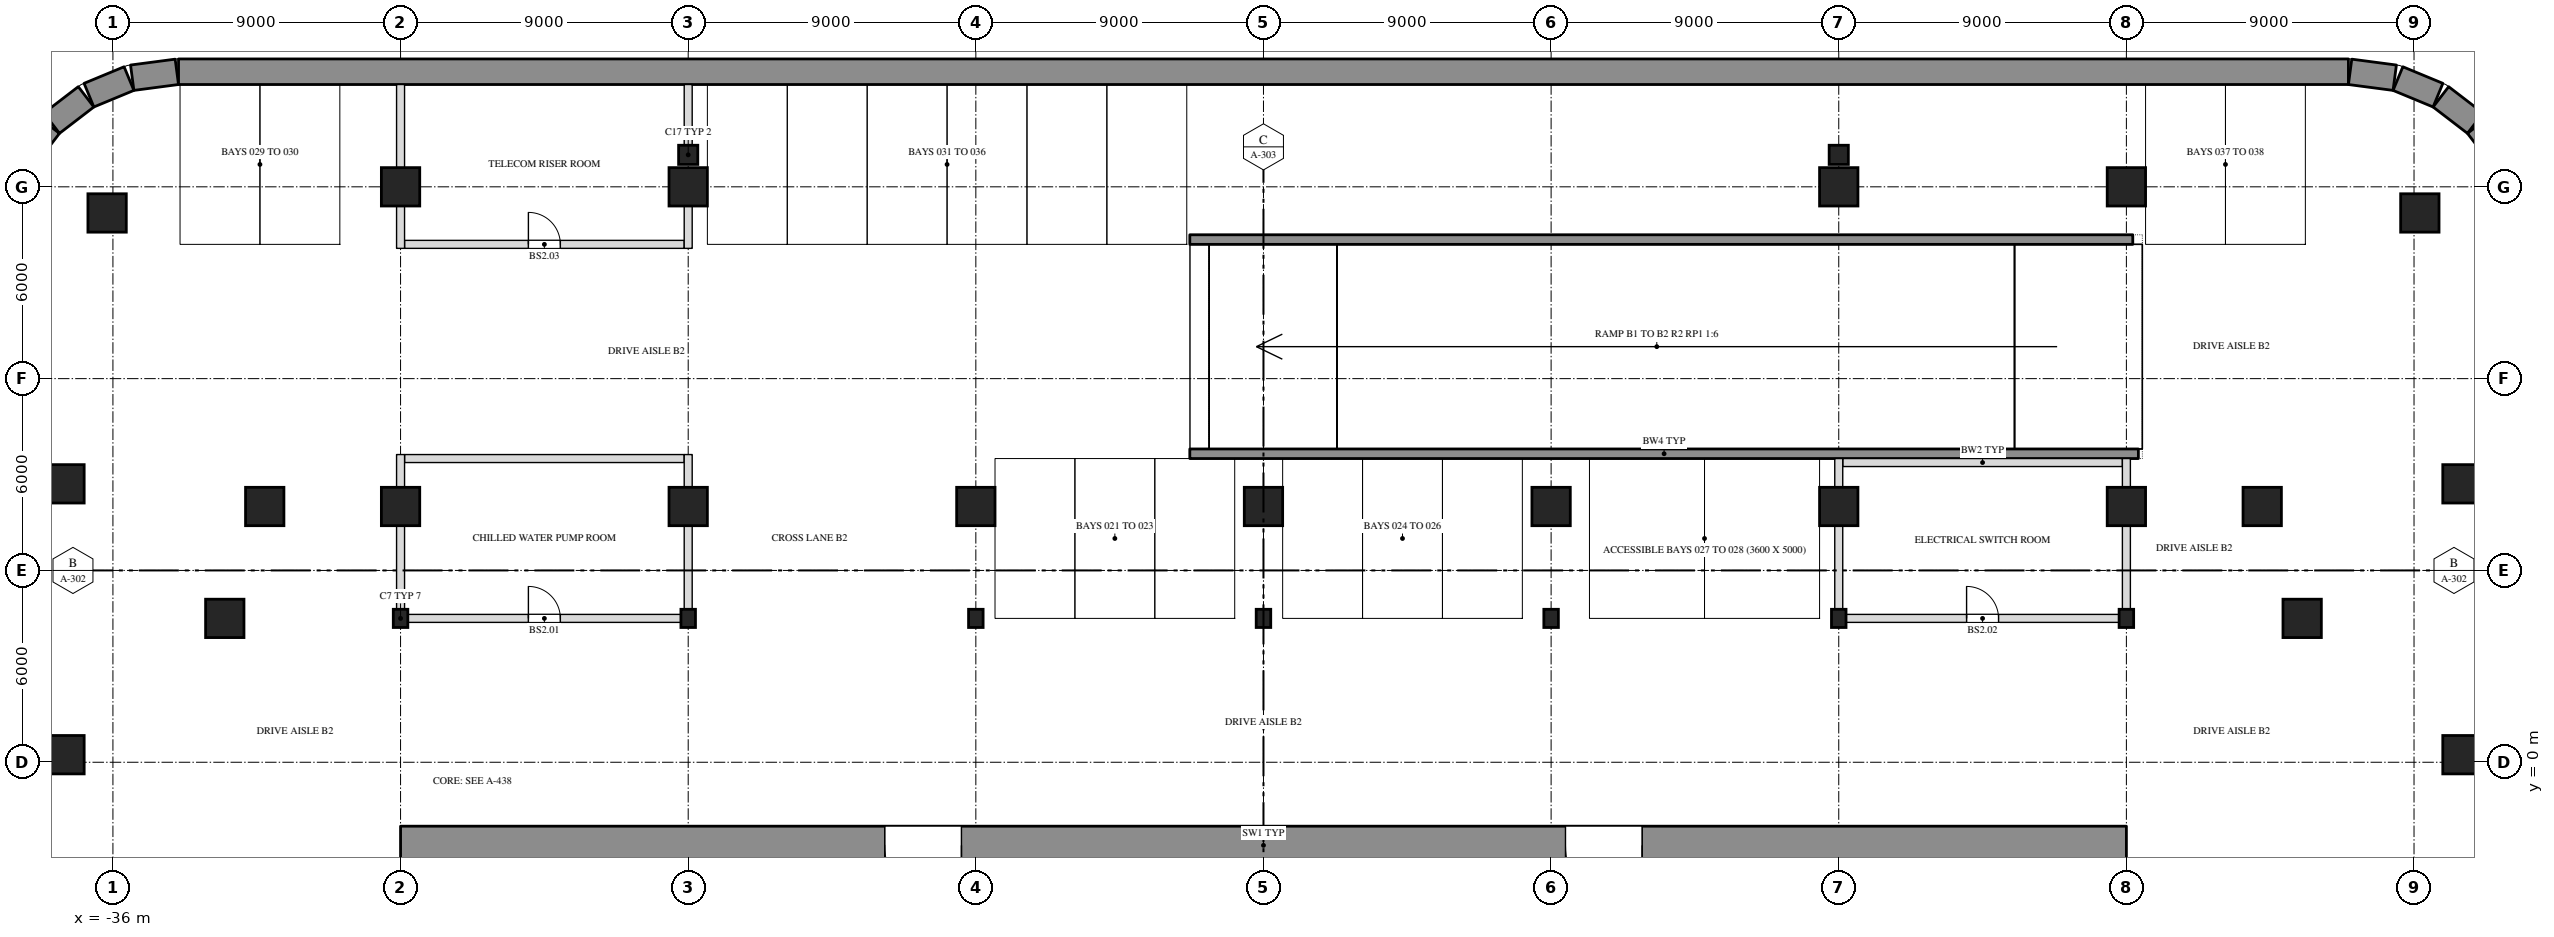
"""IFC4 building model, lengths in metres.
Left out: names, types, materials, properties, quantities, classifications, styles, units other than length and angle.
Written with IfcOpenShell. Run it as: python <this file> out.ifc"""

import sys

from ifc_helpers import new_model, si_unit, direction, frame, frame_2d, origin, origin_2d, place, context, subcontext, project, spatial, rectangle, i_section, extrude, element, fill, save


model = new_model("IFC4")
c1 = context("Model", 3, precision=1e-05, world=origin(), true_north=direction((0.0, 1.0)))
c2 = subcontext(c1, "Body", "Model", "MODEL_VIEW")
j1 = project(units=[si_unit("LENGTHUNIT", "METRE"), si_unit("PLANEANGLEUNIT", "RADIAN")], contexts=[c1])
p1 = place(None, origin())
s1 = spatial("IfcSite", under=j1, at=p1, CompositionType="ELEMENT")
p2 = place(p1, origin())
s2 = spatial("IfcBuilding", under=s1, at=p2, CompositionType="ELEMENT")
p3 = place(p2, frame((0.0, 0.0, -8.4)))
s3 = spatial("IfcBuildingStorey", under=s2, at=p3, CompositionType="ELEMENT", Elevation=-8.4)
for number, where, z_axis, x_axis in (
    (1, (-38.815, 18.84, 0.0), (0.0, 0.0, 1.0), (0.609, 0.793, 0.0)),
    (2, (-37.916, 19.99, 0.0), (0.0, 0.0, 1.0), (0.793, 0.609, 0.0)),
    (3, (-36.75, 20.867, 0.0), (0.0, 0.0, 1.0), (0.924, 0.383, 0.0)),
):
    element("IfcWall", number, at=place(p3, frame(where, z_axis=z_axis, x_axis=x_axis)), inside=s3, PredefinedType="SOLIDWALL", context=c2, shape_type="SweptSolid", body=[
        extrude(rectangle(XDim=1.355, YDim=0.8, at=frame_2d((0.678, 0.0))), origin(), (0.0, 0.0, 1.0), 4.2),
    ])
p4 = place(p3, frame((-35.396, 21.413, 0.0), z_axis=(0.0, 0.0, 1.0), x_axis=(0.99144603414, 0.130517283865, 0.0)))
e4 = element("IfcWall", 4, at=p4, inside=s3, PredefinedType="SOLIDWALL", context=c2, shape_type="SweptSolid", body=[
    extrude(rectangle(XDim=1.408, YDim=0.8, at=frame_2d((0.704, 0.0))), origin(), (0.0, 0.0, 1.0), 4.2),
])
p5 = place(p3, frame((-33.948, 21.6, 0.0), z_axis=(0.0, 0.0, 1.0), x_axis=(1.0, 0.0, 0.0)))
e5 = element("IfcWall", 5, at=p5, inside=s3, PredefinedType="SOLIDWALL", context=c2, shape_type="SweptSolid", body=[
    extrude(rectangle(XDim=67.895, YDim=0.8, at=frame_2d((33.948, 0.0))), origin(), (0.0, 0.0, 1.0), 4.2),
])
p6 = place(p3, frame((34.0, 21.597, 0.0), z_axis=(0.0, 0.0, 1.0), x_axis=(0.99144603414, -0.130517283865, 0.0)))
e6 = element("IfcWall", 6, at=p6, inside=s3, PredefinedType="SOLIDWALL", context=c2, shape_type="SweptSolid", body=[
    extrude(rectangle(XDim=1.408, YDim=0.8, at=frame_2d((0.704, 0.0))), origin(), (0.0, 0.0, 1.0), 4.2),
])
for number, where, z_axis, x_axis in (
    (7, (35.497, 21.386, 0.0), (0.0, 0.0, 1.0), (0.924, -0.383, 0.0)),
    (8, (36.84, 20.815, 0.0), (0.0, 0.0, 1.0), (0.793, -0.609, 0.0)),
    (9, (37.99, 19.916, 0.0), (0.0, 0.0, 1.0), (0.609, -0.793, 0.0)),
):
    element("IfcWall", number, at=place(p3, frame(where, z_axis=z_axis, x_axis=x_axis)), inside=s3, PredefinedType="SOLIDWALL", context=c2, shape_type="SweptSolid", body=[
        extrude(rectangle(XDim=1.355, YDim=0.8, at=frame_2d((0.678, 0.0))), origin(), (0.0, 0.0, 1.0), 4.2),
    ])
for number, where, z_axis, x_axis in (
    (10, (-37.5, 0.236, 0.0), (0.0, 0.0, 1.0), (1.0, 0.0, 0.0)),
    (11, (37.5, 0.236, 0.0), (0.0, 0.0, 1.0), (1.0, 0.0, 0.0)),
    (12, (-32.5, 4.5, 0.0), (0.0, 0.0, 1.0), (1.0, 0.0, 0.0)),
):
    element("IfcColumn", number, at=place(p3, frame(where, z_axis=z_axis, x_axis=x_axis)), inside=s3, PredefinedType="COLUMN", context=c2, shape_type="SweptSolid", body=[
        extrude(rectangle(XDim=1.2, YDim=1.2, at=origin_2d()), origin(), (0.0, 0.0, 1.0), 4.2),
    ])
for number, where, z_axis, x_axis in (
    (13, (-27.0, 4.5, 0.0), (0.0, 0.0, 1.0), (1.0, 0.0, 0.0)),
    (14, (-18.0, 4.5, 0.0), (0.0, 0.0, 1.0), (1.0, 0.0, 0.0)),
    (15, (-9.0, 4.5, 0.0), (0.0, 0.0, 1.0), (1.0, 0.0, 0.0)),
    (16, (0.0, 4.5, 0.0), (0.0, 0.0, 1.0), (1.0, 0.0, 0.0)),
    (17, (9.0, 4.5, 0.0), (0.0, 0.0, 1.0), (1.0, 0.0, 0.0)),
    (18, (18.0, 4.5, 0.0), (0.0, 0.0, 1.0), (1.0, 0.0, 0.0)),
    (19, (27.0, 4.5, 0.0), (0.0, 0.0, 1.0), (1.0, 0.0, 0.0)),
):
    element("IfcColumn", number, at=place(p3, frame(where, z_axis=z_axis, x_axis=x_axis)), inside=s3, PredefinedType="COLUMN", context=c2, shape_type="SweptSolid", body=[
        extrude(i_section(OverallWidth=0.455, OverallDepth=0.569, WebThickness=0.078, FlangeThickness=0.125, at=origin_2d()), origin(), (0.0, 0.0, 1.0), 4.2),
    ])
for number, where, z_axis, x_axis in (
    (20, (32.5, 4.5, 0.0), (0.0, 0.0, 1.0), (1.0, 0.0, 0.0)),
    (21, (-31.25, 8.0, 0.0), (0.0, 0.0, 1.0), (1.0, 0.0, 0.0)),
    (22, (-27.0, 8.0, 0.0), (0.0, 0.0, 1.0), (1.0, 0.0, 0.0)),
    (23, (-18.0, 8.0, 0.0), (0.0, 0.0, 1.0), (1.0, 0.0, 0.0)),
    (24, (-9.0, 8.0, 0.0), (0.0, 0.0, 1.0), (1.0, 0.0, 0.0)),
    (25, (0.0, 8.0, 0.0), (0.0, 0.0, 1.0), (1.0, 0.0, 0.0)),
    (26, (9.0, 8.0, 0.0), (0.0, 0.0, 1.0), (1.0, 0.0, 0.0)),
    (27, (18.0, 8.0, 0.0), (0.0, 0.0, 1.0), (1.0, 0.0, 0.0)),
    (28, (27.0, 8.0, 0.0), (0.0, 0.0, 1.0), (1.0, 0.0, 0.0)),
    (29, (31.25, 8.0, 0.0), (0.0, 0.0, 1.0), (1.0, 0.0, 0.0)),
    (30, (-37.5, 8.709, 0.0), (0.0, 0.0, 1.0), (1.0, 0.0, 0.0)),
    (31, (37.5, 8.709, 0.0), (0.0, 0.0, 1.0), (1.0, 0.0, 0.0)),
    (32, (-36.182, 17.182, 0.0), (0.0, 0.0, 1.0), (1.0, 0.0, 0.0)),
    (33, (36.182, 17.182, 0.0), (0.0, 0.0, 1.0), (1.0, 0.0, 0.0)),
    (34, (-27.0, 18.0, 0.0), (0.0, 0.0, 1.0), (1.0, 0.0, 0.0)),
    (35, (-18.0, 18.0, 0.0), (0.0, 0.0, 1.0), (1.0, 0.0, 0.0)),
    (36, (18.0, 18.0, 0.0), (0.0, 0.0, 1.0), (1.0, 0.0, 0.0)),
    (37, (27.0, 18.0, 0.0), (0.0, 0.0, 1.0), (1.0, 0.0, 0.0)),
):
    element("IfcColumn", number, at=place(p3, frame(where, z_axis=z_axis, x_axis=x_axis)), inside=s3, PredefinedType="COLUMN", context=c2, shape_type="SweptSolid", body=[
        extrude(rectangle(XDim=1.2, YDim=1.2, at=origin_2d()), origin(), (0.0, 0.0, 1.0), 4.2),
    ])
for number, where, z_axis, x_axis in (
    (38, (-18.0, 19.0, 0.0), (0.0, 0.0, 1.0), (1.0, 0.0, 0.0)),
    (39, (18.0, 19.0, 0.0), (0.0, 0.0, 1.0), (1.0, 0.0, 0.0)),
):
    element("IfcColumn", number, at=place(p3, frame(where, z_axis=z_axis, x_axis=x_axis)), inside=s3, PredefinedType="COLUMN", context=c2, shape_type="SweptSolid", body=[
        extrude(rectangle(XDim=0.6, YDim=0.6, at=origin_2d()), origin(), (0.0, 0.0, 1.0), 4.2),
    ])
p7 = place(p3, frame((-27.0, -2.6, 0.0), z_axis=(0.0, 0.0, 1.0), x_axis=(1.0, 0.0, 0.0)))
e40 = element("IfcWall", 40, at=p7, inside=s3, PredefinedType="SHEAR", context=c2, shape_type="SweptSolid", body=[
    extrude(rectangle(XDim=54.0, YDim=1.2, at=frame_2d((27.0, 0.0))), origin(), (0.0, 0.0, 1.0), 3.9),
])
p8 = place(p7, frame((15.15, 0.0, 0.0)))
e41 = element("IfcOpeningElement", 41, at=p8, cuts=e40, PredefinedType="OPENING", context=c2, shape_type="SweptSolid", body=[
    extrude(rectangle(XDim=2.4, YDim=2.1, at=frame_2d((1.2, 1.05))), frame((0.0, 0.612, 0.0), z_axis=(0.0, -1.0, 0.0), x_axis=(1.0, 0.0, 0.0)), (0.0, 0.0, 1.0), 1.224),
])
p9 = place(p7, frame((36.45, 0.0, 0.0)))
e42 = element("IfcOpeningElement", 42, at=p9, cuts=e40, PredefinedType="OPENING", context=c2, shape_type="SweptSolid", body=[
    extrude(rectangle(XDim=2.4, YDim=2.1, at=frame_2d((1.2, 1.05))), frame((0.0, 0.612, 0.0), z_axis=(0.0, -1.0, 0.0), x_axis=(1.0, 0.0, 0.0)), (0.0, 0.0, 1.0), 1.224),
])
p10 = place(p3, frame((-26.773, 4.5, 0.0), z_axis=(0.0, 0.0, 1.0), x_axis=(1.0, 0.0, 0.0)))
e43 = element("IfcWall", 43, at=p10, inside=s3, PredefinedType="SOLIDWALL", context=c2, shape_type="SweptSolid", body=[
    extrude(rectangle(XDim=8.545, YDim=0.25, at=frame_2d((4.273, 0.0))), origin(), (0.0, 0.0, 1.0), 3.9),
])
p11 = place(p10, frame((3.773, 0.0, 0.0)))
e44 = element("IfcOpeningElement", 44, at=p11, cuts=e43, PredefinedType="OPENING", context=c2, shape_type="SweptSolid", body=[
    extrude(rectangle(XDim=1.0, YDim=2.1, at=frame_2d((0.5, 1.05))), frame((0.0, 0.137, 0.0), z_axis=(0.0, -1.0, 0.0), x_axis=(1.0, 0.0, 0.0)), (0.0, 0.0, 1.0), 0.274),
])
p12 = place(p3, frame((18.227, 4.5, 0.0), z_axis=(0.0, 0.0, 1.0), x_axis=(1.0, 0.0, 0.0)))
e45 = element("IfcWall", 45, at=p12, inside=s3, PredefinedType="SOLIDWALL", context=c2, shape_type="SweptSolid", body=[
    extrude(rectangle(XDim=8.545, YDim=0.25, at=frame_2d((4.273, 0.0))), origin(), (0.0, 0.0, 1.0), 3.9),
])
p13 = place(p12, frame((3.773, 0.0, 0.0)))
e46 = element("IfcOpeningElement", 46, at=p13, cuts=e45, PredefinedType="OPENING", context=c2, shape_type="SweptSolid", body=[
    extrude(rectangle(XDim=1.0, YDim=2.1, at=frame_2d((0.5, 1.05))), frame((0.0, 0.137, 0.0), z_axis=(0.0, -1.0, 0.0), x_axis=(1.0, 0.0, 0.0)), (0.0, 0.0, 1.0), 0.274),
])
for number, where, z_axis, x_axis in (
    (47, (18.125, 9.375, 0.0), (0.0, 0.0, 1.0), (1.0, 0.0, 0.0)),
    (48, (-26.875, 9.5, 0.0), (0.0, 0.0, 1.0), (1.0, 0.0, 0.0)),
):
    element("IfcWall", number, at=place(p3, frame(where, z_axis=z_axis, x_axis=x_axis)), inside=s3, PredefinedType="SOLIDWALL", context=c2, shape_type="SweptSolid", body=[
        extrude(rectangle(XDim=8.75, YDim=0.25, at=frame_2d((4.375, 0.0))), origin(), (0.0, 0.0, 1.0), 3.9),
    ])
p14 = place(p3, frame((-26.875, 16.2, 0.0), z_axis=(0.0, 0.0, 1.0), x_axis=(1.0, 0.0, 0.0)))
e49 = element("IfcWall", 49, at=p14, inside=s3, PredefinedType="SOLIDWALL", context=c2, shape_type="SweptSolid", body=[
    extrude(rectangle(XDim=8.75, YDim=0.25, at=frame_2d((4.375, 0.0))), origin(), (0.0, 0.0, 1.0), 3.9),
])
p15 = place(p14, frame((3.875, 0.0, 0.0)))
e50 = element("IfcOpeningElement", 50, at=p15, cuts=e49, PredefinedType="OPENING", context=c2, shape_type="SweptSolid", body=[
    extrude(rectangle(XDim=1.0, YDim=2.1, at=frame_2d((0.5, 1.05))), frame((0.0, 0.137, 0.0), z_axis=(0.0, -1.0, 0.0), x_axis=(1.0, 0.0, 0.0)), (0.0, 0.0, 1.0), 0.274),
])
p16 = place(p3, frame((-27.0, 4.784, 0.0), z_axis=(0.0, 0.0, 1.0), x_axis=(0.0, 1.0, 0.0)))
e51 = element("IfcWall", 51, at=p16, inside=s3, PredefinedType="SOLIDWALL", context=c2, shape_type="SweptSolid", body=[
    extrude(rectangle(XDim=2.615, YDim=0.25, at=frame_2d((1.308, 0.0))), origin(), (0.0, 0.0, 1.0), 3.9),
])
p17 = place(p3, frame((-27.0, 8.6, 0.0), z_axis=(0.0, 0.0, 1.0), x_axis=(0.0, 1.0, 0.0)))
e52 = element("IfcWall", 52, at=p17, inside=s3, PredefinedType="SOLIDWALL", context=c2, shape_type="SweptSolid", body=[
    extrude(rectangle(XDim=1.025, YDim=0.25, at=frame_2d((0.512, 0.0))), origin(), (0.0, 0.0, 1.0), 3.9),
])
p18 = place(p3, frame((-27.0, 16.075, 0.0), z_axis=(0.0, 0.0, 1.0), x_axis=(0.0, 1.0, 0.0)))
e53 = element("IfcWall", 53, at=p18, inside=s3, PredefinedType="SOLIDWALL", context=c2, shape_type="SweptSolid", body=[
    extrude(rectangle(XDim=1.325, YDim=0.25, at=frame_2d((0.663, 0.0))), origin(), (0.0, 0.0, 1.0), 3.9),
])
p19 = place(p3, frame((-27.0, 18.6, 0.0), z_axis=(0.0, 0.0, 1.0), x_axis=(0.0, 1.0, 0.0)))
e54 = element("IfcWall", 54, at=p19, inside=s3, PredefinedType="SOLIDWALL", context=c2, shape_type="SweptSolid", body=[
    extrude(rectangle(XDim=2.6, YDim=0.25, at=frame_2d((1.3, 0.0))), origin(), (0.0, 0.0, 1.0), 3.9),
])
p20 = place(p3, frame((-18.0, 4.784, 0.0), z_axis=(0.0, 0.0, 1.0), x_axis=(0.0, 1.0, 0.0)))
e55 = element("IfcWall", 55, at=p20, inside=s3, PredefinedType="SOLIDWALL", context=c2, shape_type="SweptSolid", body=[
    extrude(rectangle(XDim=2.615, YDim=0.25, at=frame_2d((1.308, 0.0))), origin(), (0.0, 0.0, 1.0), 3.9),
])
p21 = place(p3, frame((-18.0, 8.6, 0.0), z_axis=(0.0, 0.0, 1.0), x_axis=(0.0, 1.0, 0.0)))
e56 = element("IfcWall", 56, at=p21, inside=s3, PredefinedType="SOLIDWALL", context=c2, shape_type="SweptSolid", body=[
    extrude(rectangle(XDim=1.025, YDim=0.25, at=frame_2d((0.512, 0.0))), origin(), (0.0, 0.0, 1.0), 3.9),
])
p22 = place(p3, frame((-18.0, 16.075, 0.0), z_axis=(0.0, 0.0, 1.0), x_axis=(0.0, 1.0, 0.0)))
e57 = element("IfcWall", 57, at=p22, inside=s3, PredefinedType="SOLIDWALL", context=c2, shape_type="SweptSolid", body=[
    extrude(rectangle(XDim=1.325, YDim=0.25, at=frame_2d((0.663, 0.0))), origin(), (0.0, 0.0, 1.0), 3.9),
])
p23 = place(p3, frame((-18.0, 19.3, 0.0), z_axis=(0.0, 0.0, 1.0), x_axis=(0.0, 1.0, 0.0)))
e58 = element("IfcWall", 58, at=p23, inside=s3, PredefinedType="SOLIDWALL", context=c2, shape_type="SweptSolid", body=[
    extrude(rectangle(XDim=1.9, YDim=0.25, at=frame_2d((0.95, 0.0))), origin(), (0.0, 0.0, 1.0), 3.9),
])
p24 = place(p3, frame((18.0, 4.784, 0.0), z_axis=(0.0, 0.0, 1.0), x_axis=(0.0, 1.0, 0.0)))
e59 = element("IfcWall", 59, at=p24, inside=s3, PredefinedType="SOLIDWALL", context=c2, shape_type="SweptSolid", body=[
    extrude(rectangle(XDim=2.615, YDim=0.25, at=frame_2d((1.308, 0.0))), origin(), (0.0, 0.0, 1.0), 3.9),
])
p25 = place(p3, frame((18.0, 8.6, 0.0), z_axis=(0.0, 0.0, 1.0), x_axis=(0.0, 1.0, 0.0)))
e60 = element("IfcWall", 60, at=p25, inside=s3, PredefinedType="SOLIDWALL", context=c2, shape_type="SweptSolid", body=[
    extrude(rectangle(XDim=0.9, YDim=0.25, at=frame_2d((0.45, 0.0))), origin(), (0.0, 0.0, 1.0), 3.9),
])
p26 = place(p3, frame((27.0, 4.784, 0.0), z_axis=(0.0, 0.0, 1.0), x_axis=(0.0, 1.0, 0.0)))
e61 = element("IfcWall", 61, at=p26, inside=s3, PredefinedType="SOLIDWALL", context=c2, shape_type="SweptSolid", body=[
    extrude(rectangle(XDim=2.615, YDim=0.25, at=frame_2d((1.308, 0.0))), origin(), (0.0, 0.0, 1.0), 3.9),
])
p27 = place(p3, frame((27.0, 8.6, 0.0), z_axis=(0.0, 0.0, 1.0), x_axis=(0.0, 1.0, 0.0)))
e62 = element("IfcWall", 62, at=p27, inside=s3, PredefinedType="SOLIDWALL", context=c2, shape_type="SweptSolid", body=[
    extrude(rectangle(XDim=0.9, YDim=0.25, at=frame_2d((0.45, 0.0))), origin(), (0.0, 0.0, 1.0), 3.9),
])
p28 = place(p3, frame((-2.305, 9.65, 0.0), z_axis=(0.0, 0.0, 1.0), x_axis=(1.0, 0.0, 0.0)))
e63 = element("IfcWall", 63, at=p28, inside=s3, PredefinedType="SOLIDWALL", context=c2, shape_type="SweptSolid", body=[
    extrude(rectangle(XDim=29.68, YDim=0.3, at=frame_2d((14.84, 0.0))), origin(), (0.0, 0.0, 1.0), 4.2),
])
p29 = place(p3, frame((-2.305, 16.35, 0.0), z_axis=(0.0, 0.0, 1.0), x_axis=(1.0, 0.0, 0.0)))
e64 = element("IfcWall", 64, at=p29, inside=s3, PredefinedType="SOLIDWALL", context=c2, shape_type="SweptSolid", body=[
    extrude(rectangle(XDim=29.505, YDim=0.3, at=frame_2d((14.752, 0.0))), origin(), (0.0, 0.0, 1.0), 4.2),
])
p30 = place(p11, origin())
e65 = element("IfcDoor", 65, at=p30, inside=s3, OperationType="SINGLE_SWING_LEFT", PredefinedType="DOOR", context=c2, shape_type="SweptSolid", body=[
    extrude(rectangle(XDim=1.0, YDim=2.1, at=frame_2d((0.5, 1.05))), frame((0.0, 0.025, 0.0), z_axis=(0.0, -1.0, 0.0), x_axis=(1.0, 0.0, 0.0)), (0.0, 0.0, 1.0), 0.05),
])
fill(e44, e65)
p31 = place(p13, origin())
e66 = element("IfcDoor", 66, at=p31, inside=s3, OperationType="SINGLE_SWING_LEFT", PredefinedType="DOOR", context=c2, shape_type="SweptSolid", body=[
    extrude(rectangle(XDim=1.0, YDim=2.1, at=frame_2d((0.5, 1.05))), frame((0.0, 0.025, 0.0), z_axis=(0.0, -1.0, 0.0), x_axis=(1.0, 0.0, 0.0)), (0.0, 0.0, 1.0), 0.05),
])
fill(e46, e66)
p32 = place(p15, origin())
e67 = element("IfcDoor", 67, at=p32, inside=s3, OperationType="SINGLE_SWING_LEFT", PredefinedType="DOOR", context=c2, shape_type="SweptSolid", body=[
    extrude(rectangle(XDim=1.0, YDim=2.1, at=frame_2d((0.5, 1.05))), frame((0.0, 0.025, 0.0), z_axis=(0.0, -1.0, 0.0), x_axis=(1.0, 0.0, 0.0)), (0.0, 0.0, 1.0), 0.05),
])
fill(e50, e67)
p33 = place(p8, origin())
e68 = element("IfcDoor", 68, at=p33, inside=s3, OperationType="DOUBLE_DOOR_SINGLE_SWING", PredefinedType="DOOR", context=c2, shape_type="SweptSolid", body=[
    extrude(rectangle(XDim=2.4, YDim=2.1, at=frame_2d((1.2, 1.05))), frame((0.0, 0.025, 0.0), z_axis=(0.0, -1.0, 0.0), x_axis=(1.0, 0.0, 0.0)), (0.0, 0.0, 1.0), 0.05),
])
fill(e41, e68)
p34 = place(p9, origin())
e69 = element("IfcDoor", 69, at=p34, inside=s3, OperationType="DOUBLE_DOOR_SINGLE_SWING", PredefinedType="DOOR", context=c2, shape_type="SweptSolid", body=[
    extrude(rectangle(XDim=2.4, YDim=2.1, at=frame_2d((1.2, 1.05))), frame((0.0, 0.025, 0.0), z_axis=(0.0, -1.0, 0.0), x_axis=(1.0, 0.0, 0.0)), (0.0, 0.0, 1.0), 0.05),
])
fill(e42, e69)
save(model, sys.argv[1])
